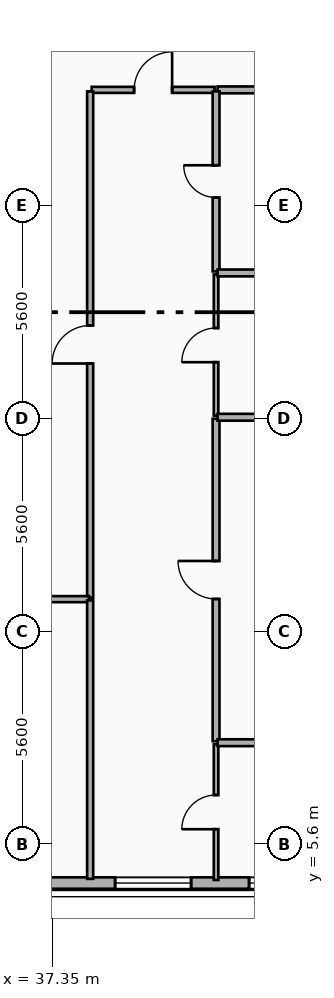
"""IFC4 building model, lengths in metres.
Left out: names, types, materials, properties, quantities, classifications, styles, units other than length and angle.
Written with IfcOpenShell. Run it as: python <this file> out.ifc"""

import sys

from ifc_helpers import new_model, si_unit, direction, frame, frame_2d, origin, place, context, subcontext, project, spatial, rectangle, extrude, element, fill, save


model = new_model("IFC4")
c1 = context("Model", 3, precision=1e-05, world=origin(), true_north=direction((0.0, 1.0)))
c2 = subcontext(c1, "Body", "Model", "MODEL_VIEW")
j1 = project(units=[si_unit("LENGTHUNIT", "METRE"), si_unit("PLANEANGLEUNIT", "RADIAN")], contexts=[c1])
p1 = place(None, origin())
s1 = spatial("IfcSite", under=j1, at=p1, CompositionType="ELEMENT")
p2 = place(p1, origin())
s2 = spatial("IfcBuilding", under=s1, at=p2, CompositionType="ELEMENT")
p3 = place(p2, frame((0.0, 0.0, 196.8)))
s3 = spatial("IfcBuildingStorey", under=s2, at=p3, CompositionType="ELEMENT", Elevation=196.8)
p4 = place(p3, frame((48.0, 4.58, 0.0), z_axis=(0.0, 0.0, 1.0), x_axis=(-1.0, 0.0, 0.0)))
e1 = element("IfcWall", 1, at=p4, inside=s3, PredefinedType="SOLIDWALL", context=c2, shape_type="SweptSolid", body=[
    extrude(rectangle(XDim=38.4, YDim=0.3, at=frame_2d((19.2, 0.0))), origin(), (0.0, 0.0, 1.0), 3.34),
])
p5 = place(p4, frame((36.19, 0.0, 0.8)))
e2 = element("IfcOpeningElement", 2, at=p5, cuts=e1, PredefinedType="OPENING", context=c2, shape_type="SweptSolid", body=[
    extrude(rectangle(XDim=1.8, YDim=1.8, at=frame_2d((0.9, 0.9))), frame((0.0, 0.16, 0.0), z_axis=(0.0, -1.0, 0.0), x_axis=(1.0, 0.0, 0.0)), (0.0, 0.0, 1.0), 0.32),
])
p6 = place(p4, frame((29.712, 0.0, 0.7)))
e3 = element("IfcOpeningElement", 3, at=p6, cuts=e1, PredefinedType="OPENING", context=c2, shape_type="SweptSolid", body=[
    extrude(rectangle(XDim=2.0, YDim=2.2, at=frame_2d((1.0, 1.1))), frame((0.0, 0.16, 0.0), z_axis=(0.0, -1.0, 0.0), x_axis=(1.0, 0.0, 0.0)), (0.0, 0.0, 1.0), 0.32),
])
p7 = place(p4, frame((33.038, 0.0, 0.7)))
e4 = element("IfcOpeningElement", 4, at=p7, cuts=e1, PredefinedType="OPENING", context=c2, shape_type="SweptSolid", body=[
    extrude(rectangle(XDim=2.0, YDim=2.2, at=frame_2d((1.0, 1.1))), frame((0.0, 0.16, 0.0), z_axis=(0.0, -1.0, 0.0), x_axis=(1.0, 0.0, 0.0)), (0.0, 0.0, 1.0), 0.32),
])
p8 = place(p4, frame((20.0, 0.0, 0.7)))
e5 = element("IfcOpeningElement", 5, at=p8, cuts=e1, PredefinedType="OPENING", context=c2, shape_type="SweptSolid", body=[
    extrude(rectangle(XDim=2.0, YDim=2.2, at=frame_2d((1.0, 1.1))), frame((0.0, 0.16, 0.0), z_axis=(0.0, -1.0, 0.0), x_axis=(1.0, 0.0, 0.0)), (0.0, 0.0, 1.0), 0.32),
])
p9 = place(p4, frame((25.2, 0.0, 0.7)))
e6 = element("IfcOpeningElement", 6, at=p9, cuts=e1, PredefinedType="OPENING", context=c2, shape_type="SweptSolid", body=[
    extrude(rectangle(XDim=2.0, YDim=2.2, at=frame_2d((1.0, 1.1))), frame((0.0, 0.16, 0.0), z_axis=(0.0, -1.0, 0.0), x_axis=(1.0, 0.0, 0.0)), (0.0, 0.0, 1.0), 0.32),
])
p10 = place(p4, frame((13.4, 0.0, 0.7)))
e7 = element("IfcOpeningElement", 7, at=p10, cuts=e1, PredefinedType="OPENING", context=c2, shape_type="SweptSolid", body=[
    extrude(rectangle(XDim=2.0, YDim=2.2, at=frame_2d((1.0, 1.1))), frame((0.0, 0.16, 0.0), z_axis=(0.0, -1.0, 0.0), x_axis=(1.0, 0.0, 0.0)), (0.0, 0.0, 1.0), 0.32),
])
p11 = place(p4, frame((6.993, 0.0, 0.7)))
e8 = element("IfcOpeningElement", 8, at=p11, cuts=e1, PredefinedType="OPENING", context=c2, shape_type="SweptSolid", body=[
    extrude(rectangle(XDim=2.0, YDim=2.2, at=frame_2d((1.0, 1.1))), frame((0.0, 0.16, 0.0), z_axis=(0.0, -1.0, 0.0), x_axis=(1.0, 0.0, 0.0)), (0.0, 0.0, 1.0), 0.32),
])
p12 = place(p4, frame((3.469, 0.0, 0.7)))
e9 = element("IfcOpeningElement", 9, at=p12, cuts=e1, PredefinedType="OPENING", context=c2, shape_type="SweptSolid", body=[
    extrude(rectangle(XDim=2.0, YDim=2.2, at=frame_2d((1.0, 1.1))), frame((0.0, 0.16, 0.0), z_axis=(0.0, -1.0, 0.0), x_axis=(1.0, 0.0, 0.0)), (0.0, 0.0, 1.0), 0.32),
])
p13 = place(p4, frame((0.41, 0.0, 0.8)))
e10 = element("IfcOpeningElement", 10, at=p13, cuts=e1, PredefinedType="OPENING", context=c2, shape_type="SweptSolid", body=[
    extrude(rectangle(XDim=1.8, YDim=1.8, at=frame_2d((0.9, 0.9))), frame((0.0, 0.16, 0.0), z_axis=(0.0, -1.0, 0.0), x_axis=(1.0, 0.0, 0.0)), (0.0, 0.0, 1.0), 0.32),
])
p14 = place(p3, frame((38.39, 25.45, 0.0), z_axis=(0.0, 0.0, 1.0), x_axis=(1.0, 0.0, 0.0)))
e11 = element("IfcWall", 11, at=p14, inside=s3, PredefinedType="PARTITIONING", context=c2, shape_type="SweptSolid", body=[
    extrude(rectangle(XDim=3.233, YDim=0.16, at=frame_2d((1.617, 0.0))), origin(), (0.0, 0.0, 1.0), 3.34),
])
p15 = place(p14, frame((1.116, 0.0, 0.0)))
e12 = element("IfcOpeningElement", 12, at=p15, cuts=e11, PredefinedType="OPENING", context=c2, shape_type="SweptSolid", body=[
    extrude(rectangle(XDim=1.0, YDim=2.15, at=frame_2d((0.5, 1.075))), frame((0.0, 0.09, 0.0), z_axis=(0.0, -1.0, 0.0), x_axis=(1.0, 0.0, 0.0)), (0.0, 0.0, 1.0), 0.18),
])
p16 = place(p3, frame((41.703, 25.45, 0.0), z_axis=(0.0, 0.0, 1.0), x_axis=(1.0, 0.0, 0.0)))
e13 = element("IfcWall", 13, at=p16, inside=s3, PredefinedType="PLUMBINGWALL", context=c2, shape_type="SweptSolid", body=[
    extrude(rectangle(XDim=3.657, YDim=0.18, at=frame_2d((1.829, 0.0))), origin(), (0.0, 0.0, 1.0), 2.42),
])
p17 = place(p3, frame((38.35, 12.09, 0.0), z_axis=(0.0, 0.0, 1.0), x_axis=(0.0, 1.0, 0.0)))
e14 = element("IfcWall", 14, at=p17, inside=s3, PredefinedType="PARTITIONING", context=c2, shape_type="SweptSolid", body=[
    extrude(rectangle(XDim=13.32, YDim=0.16, at=frame_2d((6.66, 0.0))), origin(), (0.0, 0.0, 1.0), 2.87),
])
p18 = place(p17, frame((6.16, 0.0, 0.0)))
e15 = element("IfcOpeningElement", 15, at=p18, cuts=e14, PredefinedType="OPENING", context=c2, shape_type="SweptSolid", body=[
    extrude(rectangle(XDim=1.0, YDim=2.15, at=frame_2d((0.5, 1.075))), frame((0.0, 0.09, 0.0), z_axis=(0.0, -1.0, 0.0), x_axis=(1.0, 0.0, 0.0)), (0.0, 0.0, 1.0), 0.18),
])
p19 = place(p3, frame((41.663, 4.66, 0.0), z_axis=(0.0, 0.0, 1.0), x_axis=(0.0, 1.0, 0.0)))
e16 = element("IfcWall", 16, at=p19, inside=s3, PredefinedType="PARTITIONING", context=c2, shape_type="SweptSolid", body=[
    extrude(rectangle(XDim=3.573, YDim=0.12, at=frame_2d((1.787, 0.0))), origin(), (0.0, 0.0, 1.0), 3.0),
])
p20 = place(p19, frame((1.336, 0.0, 0.0)))
e17 = element("IfcOpeningElement", 17, at=p20, cuts=e16, PredefinedType="OPENING", context=c2, shape_type="SweptSolid", body=[
    extrude(rectangle(XDim=0.9, YDim=2.1, at=frame_2d((0.45, 1.05))), frame((0.0, 0.07, 0.0), z_axis=(0.0, -1.0, 0.0), x_axis=(1.0, 0.0, 0.0)), (0.0, 0.0, 1.0), 0.14),
])
p21 = place(p3, frame((41.663, 8.313, 0.0), z_axis=(0.0, 0.0, 1.0), x_axis=(0.0, 1.0, 0.0)))
e18 = element("IfcWall", 18, at=p21, inside=s3, PredefinedType="PLUMBINGWALL", context=c2, shape_type="SweptSolid", body=[
    extrude(rectangle(XDim=8.483, YDim=0.18, at=frame_2d((4.241, 0.0))), origin(), (0.0, 0.0, 1.0), 2.87),
])
p22 = place(p21, frame((3.741, 0.0, 0.0)))
e19 = element("IfcOpeningElement", 19, at=p22, cuts=e18, PredefinedType="OPENING", context=c2, shape_type="SweptSolid", body=[
    extrude(rectangle(XDim=1.0, YDim=2.15, at=frame_2d((0.5, 1.075))), frame((0.0, 0.1, 0.0), z_axis=(0.0, -1.0, 0.0), x_axis=(1.0, 0.0, 0.0)), (0.0, 0.0, 1.0), 0.2),
])
p23 = place(p3, frame((41.663, 16.876, 0.0), z_axis=(0.0, 0.0, 1.0), x_axis=(0.0, 1.0, 0.0)))
e20 = element("IfcWall", 20, at=p23, inside=s3, PredefinedType="PARTITIONING", context=c2, shape_type="SweptSolid", body=[
    extrude(rectangle(XDim=3.717, YDim=0.12, at=frame_2d((1.858, 0.0))), origin(), (0.0, 0.0, 1.0), 2.87),
])
p24 = place(p23, frame((1.408, 0.0, 0.0)))
e21 = element("IfcOpeningElement", 21, at=p24, cuts=e20, PredefinedType="OPENING", context=c2, shape_type="SweptSolid", body=[
    extrude(rectangle(XDim=0.9, YDim=2.1, at=frame_2d((0.45, 1.05))), frame((0.0, 0.07, 0.0), z_axis=(0.0, -1.0, 0.0), x_axis=(1.0, 0.0, 0.0)), (0.0, 0.0, 1.0), 0.14),
])
p25 = place(p3, frame((41.663, 20.673, 0.0), z_axis=(0.0, 0.0, 1.0), x_axis=(0.0, 1.0, 0.0)))
e22 = element("IfcWall", 22, at=p25, inside=s3, PredefinedType="PLUMBINGWALL", context=c2, shape_type="SweptSolid", body=[
    extrude(rectangle(XDim=4.737, YDim=0.18, at=frame_2d((2.368, 0.0))), origin(), (0.0, 0.0, 1.0), 2.88),
])
p26 = place(p25, frame((1.944, 0.0, 0.0)))
e23 = element("IfcOpeningElement", 23, at=p26, cuts=e22, PredefinedType="OPENING", context=c2, shape_type="SweptSolid", body=[
    extrude(rectangle(XDim=0.85, YDim=2.1, at=frame_2d((0.425, 1.05))), frame((0.0, 0.1, 0.0), z_axis=(0.0, -1.0, 0.0), x_axis=(1.0, 0.0, 0.0)), (0.0, 0.0, 1.0), 0.2),
])
for number, where, z_axis, x_axis in (
    (24, (41.703, 8.273, 0.0), (0.0, 0.0, 1.0), (1.0, 0.0, 0.0)),
    (25, (41.703, 16.836, 0.0), (0.0, 0.0, 1.0), (1.0, 0.0, 0.0)),
    (26, (41.703, 20.633, 0.0), (0.0, 0.0, 1.0), (1.0, 0.0, 0.0)),
):
    element("IfcWall", number, at=place(p3, frame(where, z_axis=z_axis, x_axis=x_axis)), inside=s3, PredefinedType="PLUMBINGWALL", context=c2, shape_type="SweptSolid", body=[
        extrude(rectangle(XDim=3.657, YDim=0.18, at=frame_2d((1.829, 0.0))), origin(), (0.0, 0.0, 1.0), 2.42),
    ])
p27 = place(p3, frame((36.38, 12.05, 0.0), z_axis=(0.0, 0.0, 1.0), x_axis=(1.0, 0.0, 0.0)))
e27 = element("IfcWall", 27, at=p27, inside=s3, PredefinedType="PARTITIONING", context=c2, shape_type="SweptSolid", body=[
    extrude(rectangle(XDim=1.94, YDim=0.16, at=frame_2d((0.97, 0.0))), origin(), (0.0, 0.0, 1.0), 2.42),
])
p28 = place(p3, frame((38.35, 4.69, 0.0), z_axis=(0.0, 0.0, 1.0), x_axis=(0.0, 1.0, 0.0)))
e28 = element("IfcWall", 28, at=p28, inside=s3, PredefinedType="PARTITIONING", context=c2, shape_type="SweptSolid", body=[
    extrude(rectangle(XDim=7.33, YDim=0.16, at=frame_2d((3.665, 0.0))), origin(), (0.0, 0.0, 1.0), 2.87),
])
p29 = place(p11, origin())
e29 = element("IfcWindow", 29, at=p29, inside=s3, PartitioningType="SINGLE_PANEL", PredefinedType="WINDOW", context=c2, shape_type="SweptSolid", body=[
    extrude(rectangle(XDim=2.0, YDim=2.2, at=frame_2d((1.0, 1.1))), frame((0.0, 0.03, 0.0), z_axis=(0.0, -1.0, 0.0), x_axis=(1.0, 0.0, 0.0)), (0.0, 0.0, 1.0), 0.06),
])
fill(e8, e29)
p30 = place(p12, origin())
e30 = element("IfcWindow", 30, at=p30, inside=s3, PartitioningType="SINGLE_PANEL", PredefinedType="WINDOW", context=c2, shape_type="SweptSolid", body=[
    extrude(rectangle(XDim=2.0, YDim=2.2, at=frame_2d((1.0, 1.1))), frame((0.0, 0.03, 0.0), z_axis=(0.0, -1.0, 0.0), x_axis=(1.0, 0.0, 0.0)), (0.0, 0.0, 1.0), 0.06),
])
fill(e9, e30)
p31 = place(p15, origin())
e31 = element("IfcDoor", 31, at=p31, inside=s3, OperationType="SINGLE_SWING_RIGHT", PredefinedType="DOOR", context=c2, shape_type="SweptSolid", body=[
    extrude(rectangle(XDim=1.0, YDim=2.15, at=frame_2d((0.5, 1.075))), frame((0.0, 0.025, 0.0), z_axis=(0.0, -1.0, 0.0), x_axis=(1.0, 0.0, 0.0)), (0.0, 0.0, 1.0), 0.05),
])
fill(e12, e31)
p32 = place(p18, origin())
e32 = element("IfcDoor", 32, at=p32, inside=s3, OperationType="SINGLE_SWING_LEFT", PredefinedType="DOOR", context=c2, shape_type="SweptSolid", body=[
    extrude(rectangle(XDim=1.0, YDim=2.15, at=frame_2d((0.5, 1.075))), frame((0.0, 0.025, 0.0), z_axis=(0.0, -1.0, 0.0), x_axis=(1.0, 0.0, 0.0)), (0.0, 0.0, 1.0), 0.05),
])
fill(e15, e32)
p33 = place(p20, origin())
e33 = element("IfcDoor", 33, at=p33, inside=s3, OperationType="SINGLE_SWING_LEFT", PredefinedType="DOOR", context=c2, shape_type="SweptSolid", body=[
    extrude(rectangle(XDim=0.9, YDim=2.1, at=frame_2d((0.45, 1.05))), frame((0.0, 0.025, 0.0), z_axis=(0.0, -1.0, 0.0), x_axis=(1.0, 0.0, 0.0)), (0.0, 0.0, 1.0), 0.05),
])
fill(e17, e33)
p34 = place(p22, origin())
e34 = element("IfcDoor", 34, at=p34, inside=s3, OperationType="SINGLE_SWING_RIGHT", PredefinedType="DOOR", context=c2, shape_type="SweptSolid", body=[
    extrude(rectangle(XDim=1.0, YDim=2.15, at=frame_2d((0.5, 1.075))), frame((0.0, 0.025, 0.0), z_axis=(0.0, -1.0, 0.0), x_axis=(1.0, 0.0, 0.0)), (0.0, 0.0, 1.0), 0.05),
])
fill(e19, e34)
p35 = place(p24, origin())
e35 = element("IfcDoor", 35, at=p35, inside=s3, OperationType="SINGLE_SWING_LEFT", PredefinedType="DOOR", context=c2, shape_type="SweptSolid", body=[
    extrude(rectangle(XDim=0.9, YDim=2.1, at=frame_2d((0.45, 1.05))), frame((0.0, 0.025, 0.0), z_axis=(0.0, -1.0, 0.0), x_axis=(1.0, 0.0, 0.0)), (0.0, 0.0, 1.0), 0.05),
])
fill(e21, e35)
p36 = place(p26, origin())
e36 = element("IfcDoor", 36, at=p36, inside=s3, OperationType="SINGLE_SWING_RIGHT", PredefinedType="DOOR", context=c2, shape_type="SweptSolid", body=[
    extrude(rectangle(XDim=0.85, YDim=2.1, at=frame_2d((0.425, 1.05))), frame((0.0, 0.025, 0.0), z_axis=(0.0, -1.0, 0.0), x_axis=(1.0, 0.0, 0.0)), (0.0, 0.0, 1.0), 0.05),
])
fill(e23, e36)
save(model, sys.argv[1])
